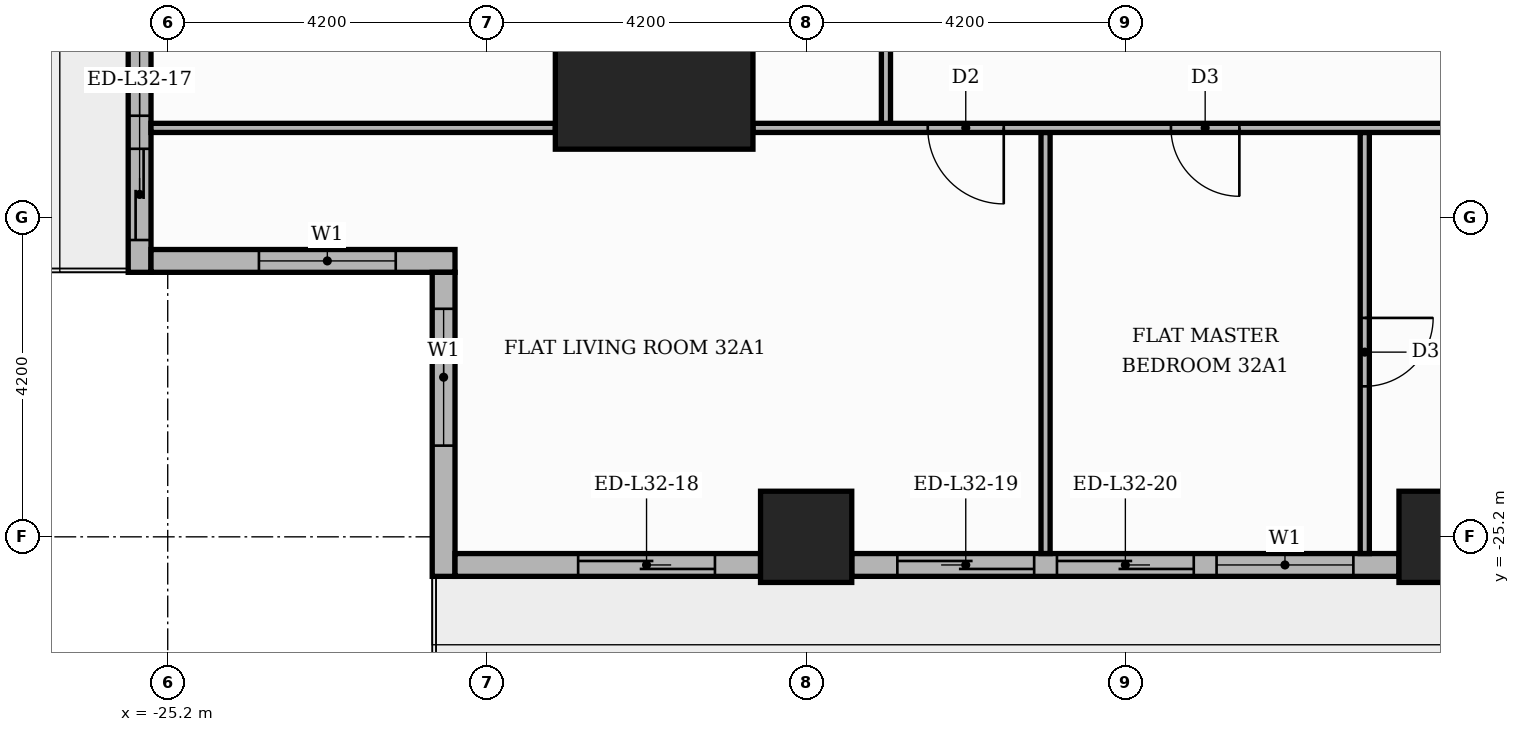
"""IFC4 building model, lengths in metres.
Left out: names, types, materials, properties, quantities, classifications, styles, units other than length and angle.
Written with IfcOpenShell. Run it as: python <this file> out.ifc"""

import sys

from ifc_helpers import new_model, si_unit, direction, frame, frame_2d, origin, origin_2d, place, context, subcontext, project, spatial, rectangle, extrude, element, fill, save


model = new_model("IFC4")
c1 = context("Model", 3, precision=1e-05, world=origin(), true_north=direction((0.0, 1.0)))
c2 = subcontext(c1, "Body", "Model", "MODEL_VIEW")
j1 = project(units=[si_unit("LENGTHUNIT", "METRE"), si_unit("PLANEANGLEUNIT", "RADIAN")], contexts=[c1])
p1 = place(None, origin())
s1 = spatial("IfcSite", under=j1, at=p1, CompositionType="ELEMENT")
p2 = place(p1, origin())
s2 = spatial("IfcBuilding", under=s1, at=p2, CompositionType="ELEMENT")
p3 = place(p2, frame((0.0, 0.0, 137.7)))
s3 = spatial("IfcBuildingStorey", under=s2, at=p3, CompositionType="ELEMENT", Elevation=137.7)
p4 = place(p3, frame((-18.8, -18.8, 0.0), z_axis=(0.0, 0.0, 1.0), x_axis=(1.0, 0.0, 0.0)))
e1 = element("IfcColumn", 1, at=p4, inside=s3, PredefinedType="COLUMN", context=c2, shape_type="SweptSolid", body=[
    extrude(rectangle(XDim=2.6, YDim=2.6, at=origin_2d()), origin(), (0.0, 0.0, 1.0), 3.9),
])
for number, where, z_axis, x_axis in (
    (2, (-8.4, -25.2, 0.0), (0.0, 0.0, 1.0), (1.0, 0.0, 0.0)),
    (3, (-16.8, -25.2, 0.0), (0.0, 0.0, 1.0), (1.0, 0.0, 0.0)),
):
    element("IfcColumn", number, at=place(p3, frame(where, z_axis=z_axis, x_axis=x_axis)), inside=s3, PredefinedType="COLUMN", context=c2, shape_type="SweptSolid", body=[
        extrude(rectangle(XDim=1.2, YDim=1.2, at=origin_2d()), origin(), (0.0, 0.0, 1.0), 3.9),
    ])
p5 = place(p3, frame((-25.57, -17.4, 0.0), z_axis=(0.0, 0.0, 1.0), x_axis=(0.0, -1.0, 0.0)))
e4 = element("IfcWall", 4, at=p5, inside=s3, PredefinedType="STANDARD", context=c2, shape_type="SweptSolid", body=[
    extrude(rectangle(XDim=4.32, YDim=0.3, at=frame_2d((2.16, 0.0))), origin(), (0.0, 0.0, 1.0), 3.48),
])
p6 = place(p5, frame((2.695, 0.0, 0.0)))
e5 = element("IfcOpeningElement", 5, at=p6, cuts=e4, PredefinedType="OPENING", context=c2, shape_type="SweptSolid", body=[
    extrude(rectangle(XDim=1.2, YDim=2.4, at=frame_2d((0.6, 1.2))), frame((0.0, 0.16, 0.0), z_axis=(0.0, -1.0, 0.0), x_axis=(1.0, 0.0, 0.0)), (0.0, 0.0, 1.0), 0.32),
])
p7 = place(p5, frame((0.46, 0.0, 0.9)))
e6 = element("IfcOpeningElement", 6, at=p7, cuts=e4, PredefinedType="OPENING", context=c2, shape_type="SweptSolid", body=[
    extrude(rectangle(XDim=1.8, YDim=2.1, at=frame_2d((0.9, 1.05))), frame((0.0, 0.16, 0.0), z_axis=(0.0, -1.0, 0.0), x_axis=(1.0, 0.0, 0.0)), (0.0, 0.0, 1.0), 0.32),
])
p8 = place(p3, frame((-25.42, -21.57, 0.0), z_axis=(0.0, 0.0, 1.0), x_axis=(1.0, 0.0, 0.0)))
e7 = element("IfcWall", 7, at=p8, inside=s3, PredefinedType="STANDARD", context=c2, shape_type="SweptSolid", body=[
    extrude(rectangle(XDim=4.0, YDim=0.3, at=frame_2d((2.0, 0.0))), origin(), (0.0, 0.0, 1.0), 3.48),
])
p9 = place(p8, frame((1.42, 0.0, 0.9)))
e8 = element("IfcOpeningElement", 8, at=p9, cuts=e7, PredefinedType="OPENING", context=c2, shape_type="SweptSolid", body=[
    extrude(rectangle(XDim=1.8, YDim=2.1, at=frame_2d((0.9, 1.05))), frame((0.0, 0.16, 0.0), z_axis=(0.0, -1.0, 0.0), x_axis=(1.0, 0.0, 0.0)), (0.0, 0.0, 1.0), 0.32),
])
p10 = place(p3, frame((-21.57, -21.72, 0.0), z_axis=(0.0, 0.0, 1.0), x_axis=(0.0, -1.0, 0.0)))
e9 = element("IfcWall", 9, at=p10, inside=s3, PredefinedType="STANDARD", context=c2, shape_type="SweptSolid", body=[
    extrude(rectangle(XDim=4.0, YDim=0.3, at=frame_2d((2.0, 0.0))), origin(), (0.0, 0.0, 1.0), 3.48),
])
p11 = place(p10, frame((0.48, 0.0, 0.9)))
e10 = element("IfcOpeningElement", 10, at=p11, cuts=e9, PredefinedType="OPENING", context=c2, shape_type="SweptSolid", body=[
    extrude(rectangle(XDim=1.8, YDim=2.1, at=frame_2d((0.9, 1.05))), frame((0.0, 0.16, 0.0), z_axis=(0.0, -1.0, 0.0), x_axis=(1.0, 0.0, 0.0)), (0.0, 0.0, 1.0), 0.32),
])
p12 = place(p3, frame((-21.42, -25.57, 0.0), z_axis=(0.0, 0.0, 1.0), x_axis=(1.0, 0.0, 0.0)))
e11 = element("IfcWall", 11, at=p12, inside=s3, PredefinedType="STANDARD", context=c2, shape_type="SweptSolid", body=[
    extrude(rectangle(XDim=4.02, YDim=0.3, at=frame_2d((2.01, 0.0))), origin(), (0.0, 0.0, 1.0), 3.48),
])
p13 = place(p12, frame((1.62, 0.0, 0.0)))
e12 = element("IfcOpeningElement", 12, at=p13, cuts=e11, PredefinedType="OPENING", context=c2, shape_type="SweptSolid", body=[
    extrude(rectangle(XDim=1.8, YDim=2.4, at=frame_2d((0.9, 1.2))), frame((0.0, 0.16, 0.0), z_axis=(0.0, -1.0, 0.0), x_axis=(1.0, 0.0, 0.0)), (0.0, 0.0, 1.0), 0.32),
])
p14 = place(p3, frame((-16.2, -25.57, 0.0), z_axis=(0.0, 0.0, 1.0), x_axis=(1.0, 0.0, 0.0)))
e13 = element("IfcWall", 13, at=p14, inside=s3, PredefinedType="STANDARD", context=c2, shape_type="SweptSolid", body=[
    extrude(rectangle(XDim=7.2, YDim=0.3, at=frame_2d((3.6, 0.0))), origin(), (0.0, 0.0, 1.0), 3.48),
])
p15 = place(p14, frame((0.6, 0.0, 0.0)))
e14 = element("IfcOpeningElement", 14, at=p15, cuts=e13, PredefinedType="OPENING", context=c2, shape_type="SweptSolid", body=[
    extrude(rectangle(XDim=1.8, YDim=2.4, at=frame_2d((0.9, 1.2))), frame((0.0, 0.16, 0.0), z_axis=(0.0, -1.0, 0.0), x_axis=(1.0, 0.0, 0.0)), (0.0, 0.0, 1.0), 0.32),
])
p16 = place(p14, frame((2.7, 0.0, 0.0)))
e15 = element("IfcOpeningElement", 15, at=p16, cuts=e13, PredefinedType="OPENING", context=c2, shape_type="SweptSolid", body=[
    extrude(rectangle(XDim=1.8, YDim=2.4, at=frame_2d((0.9, 1.2))), frame((0.0, 0.16, 0.0), z_axis=(0.0, -1.0, 0.0), x_axis=(1.0, 0.0, 0.0)), (0.0, 0.0, 1.0), 0.32),
])
p17 = place(p14, frame((4.8, 0.0, 0.9)))
e16 = element("IfcOpeningElement", 16, at=p17, cuts=e13, PredefinedType="OPENING", context=c2, shape_type="SweptSolid", body=[
    extrude(rectangle(XDim=1.8, YDim=2.1, at=frame_2d((0.9, 1.05))), frame((0.0, 0.16, 0.0), z_axis=(0.0, -1.0, 0.0), x_axis=(1.0, 0.0, 0.0)), (0.0, 0.0, 1.0), 0.32),
])
p18 = place(p3, frame((-13.65, -25.42, 0.0), z_axis=(0.0, 0.0, 1.0), x_axis=(0.0, 1.0, 0.0)))
e17 = element("IfcWall", 17, at=p18, inside=s3, PredefinedType="PARTITIONING", context=c2, shape_type="SweptSolid", body=[
    extrude(rectangle(XDim=5.54, YDim=0.12, at=frame_2d((2.77, 0.0))), origin(), (0.0, 0.0, 1.0), 3.48),
])
p19 = place(p3, frame((-9.45, -25.42, 0.0), z_axis=(0.0, 0.0, 1.0), x_axis=(0.0, 1.0, 0.0)))
e18 = element("IfcWall", 18, at=p19, inside=s3, PredefinedType="PARTITIONING", context=c2, shape_type="SweptSolid", body=[
    extrude(rectangle(XDim=5.54, YDim=0.12, at=frame_2d((2.77, 0.0))), origin(), (0.0, 0.0, 1.0), 3.48),
])
p20 = place(p19, frame((2.2, 0.0, 0.0)))
e19 = element("IfcOpeningElement", 19, at=p20, cuts=e18, PredefinedType="OPENING", context=c2, shape_type="SweptSolid", body=[
    extrude(rectangle(XDim=0.9, YDim=2.1, at=frame_2d((0.45, 1.05))), frame((0.0, 0.07, 0.0), z_axis=(0.0, -1.0, 0.0), x_axis=(1.0, 0.0, 0.0)), (0.0, 0.0, 1.0), 0.14),
])
p21 = place(p3, frame((-25.42, -19.82, 0.0), z_axis=(0.0, 0.0, 1.0), x_axis=(1.0, 0.0, 0.0)))
e20 = element("IfcWall", 20, at=p21, inside=s3, PredefinedType="PARTITIONING", context=c2, shape_type="SweptSolid", body=[
    extrude(rectangle(XDim=5.32, YDim=0.12, at=frame_2d((2.66, 0.0))), origin(), (0.0, 0.0, 1.0), 3.48),
])
p22 = place(p3, frame((-17.5, -19.82, 0.0), z_axis=(0.0, 0.0, 1.0), x_axis=(1.0, 0.0, 0.0)))
e21 = element("IfcWall", 21, at=p22, inside=s3, PredefinedType="PARTITIONING", context=c2, shape_type="SweptSolid", body=[
    extrude(rectangle(XDim=12.15, YDim=0.12, at=frame_2d((6.075, 0.0))), origin(), (0.0, 0.0, 1.0), 3.48),
])
p23 = place(p22, frame((2.3, 0.0, 0.0)))
e22 = element("IfcOpeningElement", 22, at=p23, cuts=e21, PredefinedType="OPENING", context=c2, shape_type="SweptSolid", body=[
    extrude(rectangle(XDim=1.0, YDim=2.1, at=frame_2d((0.5, 1.05))), frame((0.0, 0.07, 0.0), z_axis=(0.0, -1.0, 0.0), x_axis=(1.0, 0.0, 0.0)), (0.0, 0.0, 1.0), 0.14),
])
p24 = place(p22, frame((5.5, 0.0, 0.0)))
e23 = element("IfcOpeningElement", 23, at=p24, cuts=e21, PredefinedType="OPENING", context=c2, shape_type="SweptSolid", body=[
    extrude(rectangle(XDim=0.9, YDim=2.1, at=frame_2d((0.45, 1.05))), frame((0.0, 0.07, 0.0), z_axis=(0.0, -1.0, 0.0), x_axis=(1.0, 0.0, 0.0)), (0.0, 0.0, 1.0), 0.14),
])
p25 = place(p3, frame((-15.75, -19.76, 0.0), z_axis=(0.0, 0.0, 1.0), x_axis=(0.0, 1.0, 0.0)))
e24 = element("IfcWall", 24, at=p25, inside=s3, PredefinedType="PARTITIONING", context=c2, shape_type="SweptSolid", body=[
    extrude(rectangle(XDim=6.01, YDim=0.12, at=frame_2d((3.005, 0.0))), origin(), (0.0, 0.0, 1.0), 3.48),
])
p26 = place(p25, frame((2.525, 0.0, 0.0)))
e25 = element("IfcOpeningElement", 25, at=p26, cuts=e24, PredefinedType="OPENING", context=c2, shape_type="SweptSolid", body=[
    extrude(rectangle(XDim=1.0, YDim=2.1, at=frame_2d((0.5, 1.05))), frame((0.0, 0.07, 0.0), z_axis=(0.0, -1.0, 0.0), x_axis=(1.0, 0.0, 0.0)), (0.0, 0.0, 1.0), 0.14),
])
p27 = place(p6, origin())
e26 = element("IfcDoor", 26, at=p27, inside=s3, OperationType="SLIDING_TO_LEFT", PredefinedType="DOOR", context=c2, shape_type="SweptSolid", body=[
    extrude(rectangle(XDim=1.2, YDim=2.4, at=frame_2d((0.6, 1.2))), frame((0.0, 0.025, 0.0), z_axis=(0.0, -1.0, 0.0), x_axis=(1.0, 0.0, 0.0)), (0.0, 0.0, 1.0), 0.05),
])
fill(e5, e26)
p28 = place(p7, origin())
e27 = element("IfcWindow", 27, at=p28, inside=s3, PartitioningType="SINGLE_PANEL", PredefinedType="WINDOW", context=c2, shape_type="SweptSolid", body=[
    extrude(rectangle(XDim=1.8, YDim=2.1, at=frame_2d((0.9, 1.05))), frame((0.0, 0.03, 0.0), z_axis=(0.0, -1.0, 0.0), x_axis=(1.0, 0.0, 0.0)), (0.0, 0.0, 1.0), 0.06),
])
fill(e6, e27)
p29 = place(p9, origin())
e28 = element("IfcWindow", 28, at=p29, inside=s3, PartitioningType="SINGLE_PANEL", PredefinedType="WINDOW", context=c2, shape_type="SweptSolid", body=[
    extrude(rectangle(XDim=1.8, YDim=2.1, at=frame_2d((0.9, 1.05))), frame((0.0, 0.03, 0.0), z_axis=(0.0, -1.0, 0.0), x_axis=(1.0, 0.0, 0.0)), (0.0, 0.0, 1.0), 0.06),
])
fill(e8, e28)
p30 = place(p11, origin())
e29 = element("IfcWindow", 29, at=p30, inside=s3, PartitioningType="SINGLE_PANEL", PredefinedType="WINDOW", context=c2, shape_type="SweptSolid", body=[
    extrude(rectangle(XDim=1.8, YDim=2.1, at=frame_2d((0.9, 1.05))), frame((0.0, 0.03, 0.0), z_axis=(0.0, -1.0, 0.0), x_axis=(1.0, 0.0, 0.0)), (0.0, 0.0, 1.0), 0.06),
])
fill(e10, e29)
p31 = place(p13, origin())
e30 = element("IfcDoor", 30, at=p31, inside=s3, OperationType="SLIDING_TO_RIGHT", PredefinedType="DOOR", context=c2, shape_type="SweptSolid", body=[
    extrude(rectangle(XDim=1.8, YDim=2.4, at=frame_2d((0.9, 1.2))), frame((0.0, 0.025, 0.0), z_axis=(0.0, -1.0, 0.0), x_axis=(1.0, 0.0, 0.0)), (0.0, 0.0, 1.0), 0.05),
])
fill(e12, e30)
p32 = place(p15, origin())
e31 = element("IfcDoor", 31, at=p32, inside=s3, OperationType="SLIDING_TO_LEFT", PredefinedType="DOOR", context=c2, shape_type="SweptSolid", body=[
    extrude(rectangle(XDim=1.8, YDim=2.4, at=frame_2d((0.9, 1.2))), frame((0.0, 0.025, 0.0), z_axis=(0.0, -1.0, 0.0), x_axis=(1.0, 0.0, 0.0)), (0.0, 0.0, 1.0), 0.05),
])
fill(e14, e31)
p33 = place(p16, origin())
e32 = element("IfcDoor", 32, at=p33, inside=s3, OperationType="SLIDING_TO_RIGHT", PredefinedType="DOOR", context=c2, shape_type="SweptSolid", body=[
    extrude(rectangle(XDim=1.8, YDim=2.4, at=frame_2d((0.9, 1.2))), frame((0.0, 0.025, 0.0), z_axis=(0.0, -1.0, 0.0), x_axis=(1.0, 0.0, 0.0)), (0.0, 0.0, 1.0), 0.05),
])
fill(e15, e32)
p34 = place(p17, origin())
e33 = element("IfcWindow", 33, at=p34, inside=s3, PartitioningType="SINGLE_PANEL", PredefinedType="WINDOW", context=c2, shape_type="SweptSolid", body=[
    extrude(rectangle(XDim=1.8, YDim=2.1, at=frame_2d((0.9, 1.05))), frame((0.0, 0.03, 0.0), z_axis=(0.0, -1.0, 0.0), x_axis=(1.0, 0.0, 0.0)), (0.0, 0.0, 1.0), 0.06),
])
fill(e16, e33)
p35 = place(p23, frame((1.0, 0.0, 0.0), z_axis=(0.0, 0.0, 1.0), x_axis=(-1.0, 0.0, 0.0)))
e34 = element("IfcDoor", 34, at=p35, inside=s3, OperationType="SINGLE_SWING_RIGHT", PredefinedType="DOOR", context=c2, shape_type="SweptSolid", body=[
    extrude(rectangle(XDim=1.0, YDim=2.1, at=frame_2d((0.5, 1.05))), frame((0.0, 0.025, 0.0), z_axis=(0.0, -1.0, 0.0), x_axis=(1.0, 0.0, 0.0)), (0.0, 0.0, 1.0), 0.05),
])
fill(e22, e34)
p36 = place(p24, frame((0.9, 0.0, 0.0), z_axis=(0.0, 0.0, 1.0), x_axis=(-1.0, 0.0, 0.0)))
e35 = element("IfcDoor", 35, at=p36, inside=s3, OperationType="SINGLE_SWING_RIGHT", PredefinedType="DOOR", context=c2, shape_type="SweptSolid", body=[
    extrude(rectangle(XDim=0.9, YDim=2.1, at=frame_2d((0.45, 1.05))), frame((0.0, 0.025, 0.0), z_axis=(0.0, -1.0, 0.0), x_axis=(1.0, 0.0, 0.0)), (0.0, 0.0, 1.0), 0.05),
])
fill(e23, e35)
p37 = place(p20, frame((0.9, 0.0, 0.0), z_axis=(0.0, 0.0, 1.0), x_axis=(-1.0, 0.0, 0.0)))
e36 = element("IfcDoor", 36, at=p37, inside=s3, OperationType="SINGLE_SWING_RIGHT", PredefinedType="DOOR", context=c2, shape_type="SweptSolid", body=[
    extrude(rectangle(XDim=0.9, YDim=2.1, at=frame_2d((0.45, 1.05))), frame((0.0, 0.025, 0.0), z_axis=(0.0, -1.0, 0.0), x_axis=(1.0, 0.0, 0.0)), (0.0, 0.0, 1.0), 0.05),
])
fill(e19, e36)
save(model, sys.argv[1])
